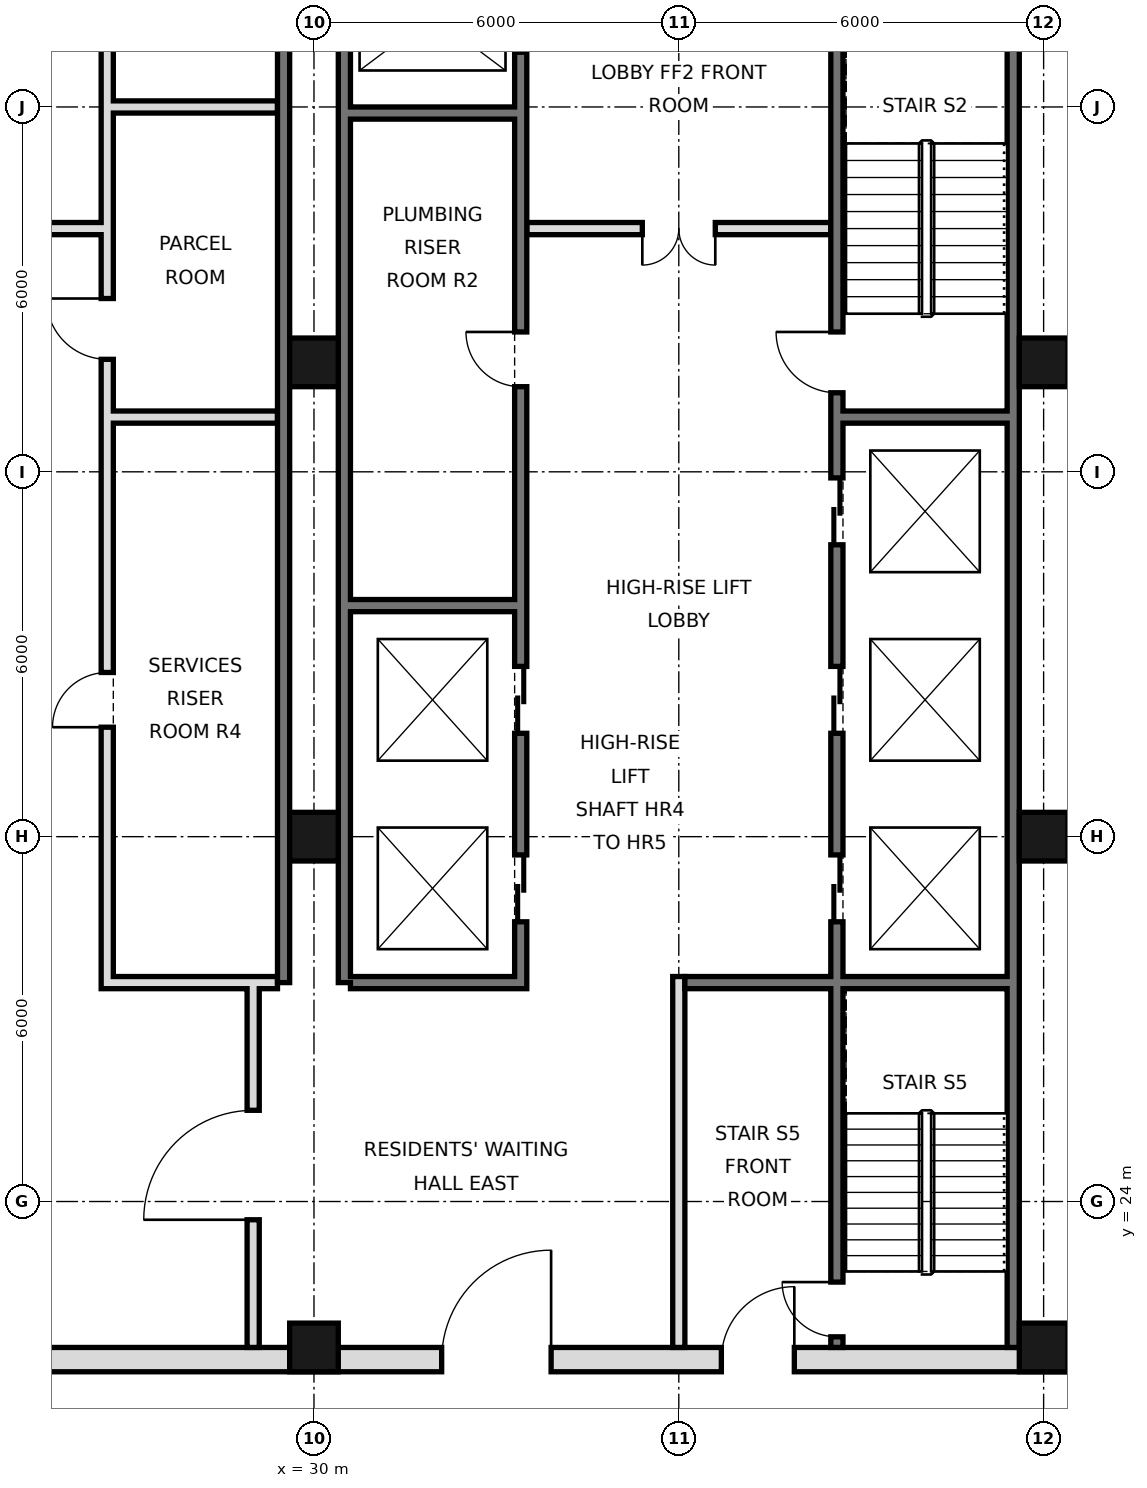
"""IFC4 building model, lengths in metres.
Left out: names, types, materials, properties, quantities, classifications, styles, units other than length and angle.
Written with IfcOpenShell. Run it as: python <this file> out.ifc"""

import sys

from ifc_helpers import new_model, si_unit, direction, frame, frame_2d, origin, origin_2d, place, context, subcontext, project, spatial, rectangle, hollow_rectangle, extrude, element, fill, save


model = new_model("IFC4")
c1 = context("Model", 3, precision=1e-05, world=origin(), true_north=direction((0.0, 1.0)))
c2 = subcontext(c1, "Body", "Model", "MODEL_VIEW")
j1 = project(units=[si_unit("LENGTHUNIT", "METRE"), si_unit("PLANEANGLEUNIT", "RADIAN")], contexts=[c1])
p1 = place(None, origin())
s1 = spatial("IfcSite", under=j1, at=p1, CompositionType="ELEMENT")
p2 = place(p1, origin())
s2 = spatial("IfcBuilding", under=s1, at=p2, CompositionType="ELEMENT")
p3 = place(p2, frame((0.0, 0.0, 273.8)))
s3 = spatial("IfcBuildingStorey", under=s2, at=p3, CompositionType="ELEMENT", Elevation=273.8)
for number, where, z_axis, x_axis in (
    (1, (30.0, 21.6, 0.0), (0.0, 0.0, 1.0), (1.0, 0.0, 0.0)),
    (2, (30.0, 30.0, 0.0), (0.0, 0.0, 1.0), (1.0, 0.0, 0.0)),
    (3, (30.0, 37.8, 0.0), (0.0, 0.0, 1.0), (1.0, 0.0, 0.0)),
    (4, (42.0, 21.6, 0.0), (0.0, 0.0, 1.0), (1.0, 0.0, 0.0)),
    (5, (42.0, 30.0, 0.0), (0.0, 0.0, 1.0), (1.0, 0.0, 0.0)),
    (6, (42.0, 37.8, 0.0), (0.0, 0.0, 1.0), (1.0, 0.0, 0.0)),
):
    element("IfcColumn", number, at=place(p3, frame(where, z_axis=z_axis, x_axis=x_axis)), inside=s3, PredefinedType="COLUMN", context=c2, shape_type="SweptSolid", body=[
        extrude(hollow_rectangle(XDim=0.8, YDim=0.8, WallThickness=0.032, at=origin_2d()), origin(), (0.0, 0.0, 1.0), 3.6),
    ])
p4 = place(p3, frame((41.5, 21.6, 0.0), z_axis=(0.0, 0.0, 1.0), x_axis=(0.0, 1.0, 0.0)))
e7 = element("IfcWall", 7, at=p4, inside=s3, PredefinedType="SOLIDWALL", context=c2, shape_type="SweptSolid", body=[
    extrude(rectangle(XDim=23.5, YDim=0.2, at=frame_2d((11.75, 0.0))), origin(), (0.0, 0.0, 1.0), 3.42),
])
for number, where, z_axis, x_axis in (
    (8, (29.5, 27.6, 0.0), (0.0, 0.0, 1.0), (0.0, 1.0, 0.0)),
    (9, (30.5, 27.6, 0.0), (0.0, 0.0, 1.0), (0.0, 1.0, 0.0)),
):
    element("IfcWall", number, at=place(p3, frame(where, z_axis=z_axis, x_axis=x_axis)), inside=s3, PredefinedType="SOLIDWALL", context=c2, shape_type="SweptSolid", body=[
        extrude(rectangle(XDim=17.5, YDim=0.2, at=frame_2d((8.75, 0.0))), origin(), (0.0, 0.0, 1.0), 3.42),
    ])
p5 = place(p3, frame((5.6, 21.4, 0.0), z_axis=(0.0, 0.0, 1.0), x_axis=(1.0, 0.0, 0.0)))
e10 = element("IfcWall", 10, at=p5, inside=s3, PredefinedType="SOLIDWALL", context=c2, shape_type="SweptSolid", body=[
    extrude(rectangle(XDim=36.8, YDim=0.4, at=frame_2d((18.4, 0.0))), origin(), (0.0, 0.0, 1.0), 3.42),
])
p6 = place(p5, frame((8.5, 0.0, 0.0)))
e11 = element("IfcOpeningElement", 11, at=p6, cuts=e10, PredefinedType="OPENING", context=c2, shape_type="SweptSolid", body=[
    extrude(rectangle(XDim=1.8, YDim=2.1, at=frame_2d((0.9, 1.05))), frame((0.0, 0.21, 0.0), z_axis=(0.0, -1.0, 0.0), x_axis=(1.0, 0.0, 0.0)), (0.0, 0.0, 1.0), 0.42),
])
p7 = place(p5, frame((17.5, 0.0, 0.0)))
e12 = element("IfcOpeningElement", 12, at=p7, cuts=e10, PredefinedType="OPENING", context=c2, shape_type="SweptSolid", body=[
    extrude(rectangle(XDim=1.8, YDim=2.1, at=frame_2d((0.9, 1.05))), frame((0.0, 0.21, 0.0), z_axis=(0.0, -1.0, 0.0), x_axis=(1.0, 0.0, 0.0)), (0.0, 0.0, 1.0), 0.42),
])
p8 = place(p5, frame((26.5, 0.0, 0.0)))
e13 = element("IfcOpeningElement", 13, at=p8, cuts=e10, PredefinedType="OPENING", context=c2, shape_type="SweptSolid", body=[
    extrude(rectangle(XDim=1.8, YDim=2.1, at=frame_2d((0.9, 1.05))), frame((0.0, 0.21, 0.0), z_axis=(0.0, -1.0, 0.0), x_axis=(1.0, 0.0, 0.0)), (0.0, 0.0, 1.0), 0.42),
])
p9 = place(p5, frame((4.5, 0.0, 0.0)))
e14 = element("IfcOpeningElement", 14, at=p9, cuts=e10, PredefinedType="OPENING", context=c2, shape_type="SweptSolid", body=[
    extrude(rectangle(XDim=1.2, YDim=2.1, at=frame_2d((0.6, 1.05))), frame((0.0, 0.21, 0.0), z_axis=(0.0, -1.0, 0.0), x_axis=(1.0, 0.0, 0.0)), (0.0, 0.0, 1.0), 0.42),
])
p10 = place(p5, frame((31.1, 0.0, 0.0)))
e15 = element("IfcOpeningElement", 15, at=p10, cuts=e10, PredefinedType="OPENING", context=c2, shape_type="SweptSolid", body=[
    extrude(rectangle(XDim=1.2, YDim=2.1, at=frame_2d((0.6, 1.05))), frame((0.0, 0.21, 0.0), z_axis=(0.0, -1.0, 0.0), x_axis=(1.0, 0.0, 0.0)), (0.0, 0.0, 1.0), 0.42),
])
p11 = place(p3, frame((29.0, 21.6, 0.0), z_axis=(0.0, 0.0, 1.0), x_axis=(0.0, 1.0, 0.0)))
e16 = element("IfcWall", 16, at=p11, inside=s3, PredefinedType="PARTITIONING", context=c2, shape_type="SweptSolid", body=[
    extrude(rectangle(XDim=6.0, YDim=0.2, at=frame_2d((3.0, 0.0))), origin(), (0.0, 0.0, 1.0), 3.42),
])
p12 = place(p11, frame((2.1, 0.0, 0.0)))
e17 = element("IfcOpeningElement", 17, at=p12, cuts=e16, PredefinedType="OPENING", context=c2, shape_type="SweptSolid", body=[
    extrude(rectangle(XDim=1.8, YDim=2.1, at=frame_2d((0.9, 1.05))), frame((0.0, 0.11, 0.0), z_axis=(0.0, -1.0, 0.0), x_axis=(1.0, 0.0, 0.0)), (0.0, 0.0, 1.0), 0.22),
])
p13 = place(p3, frame((26.6, 27.5, 0.0), z_axis=(0.0, 0.0, 1.0), x_axis=(0.0, 1.0, 0.0)))
e18 = element("IfcWall", 18, at=p13, inside=s3, PredefinedType="SOLIDWALL", context=c2, shape_type="SweptSolid", body=[
    extrude(rectangle(XDim=17.5, YDim=0.2, at=frame_2d((8.75, 0.0))), origin(), (0.0, 0.0, 1.0), 3.42),
])
p14 = place(p13, frame((4.3, 0.0, 0.0)))
e19 = element("IfcOpeningElement", 19, at=p14, cuts=e18, PredefinedType="OPENING", context=c2, shape_type="SweptSolid", body=[
    extrude(rectangle(XDim=0.9, YDim=2.1, at=frame_2d((0.45, 1.05))), frame((0.0, 0.11, 0.0), z_axis=(0.0, -1.0, 0.0), x_axis=(1.0, 0.0, 0.0)), (0.0, 0.0, 1.0), 0.22),
])
p15 = place(p13, frame((10.35, 0.0, 0.0)))
e20 = element("IfcOpeningElement", 20, at=p15, cuts=e18, PredefinedType="OPENING", context=c2, shape_type="SweptSolid", body=[
    extrude(rectangle(XDim=1.0, YDim=2.1, at=frame_2d((0.5, 1.05))), frame((0.0, 0.11, 0.0), z_axis=(0.0, -1.0, 0.0), x_axis=(1.0, 0.0, 0.0)), (0.0, 0.0, 1.0), 0.22),
])
p16 = place(p13, frame((15.475, 0.0, 0.0)))
e21 = element("IfcOpeningElement", 21, at=p16, cuts=e18, PredefinedType="OPENING", context=c2, shape_type="SweptSolid", body=[
    extrude(rectangle(XDim=1.0, YDim=2.1, at=frame_2d((0.5, 1.05))), frame((0.0, 0.11, 0.0), z_axis=(0.0, -1.0, 0.0), x_axis=(1.0, 0.0, 0.0)), (0.0, 0.0, 1.0), 0.22),
])
p17 = place(p3, frame((33.4, 27.5, 0.0), z_axis=(0.0, 0.0, 1.0), x_axis=(0.0, 1.0, 0.0)))
e22 = element("IfcWall", 22, at=p17, inside=s3, PredefinedType="SOLIDWALL", context=c2, shape_type="SweptSolid", body=[
    extrude(rectangle(XDim=17.5, YDim=0.2, at=frame_2d((8.75, 0.0))), origin(), (0.0, 0.0, 1.0), 3.42),
])
p18 = place(p17, frame((1.1, 0.0, 0.0)))
e23 = element("IfcOpeningElement", 23, at=p18, cuts=e22, PredefinedType="OPENING", context=c2, shape_type="SweptSolid", body=[
    extrude(rectangle(XDim=1.1, YDim=2.1, at=frame_2d((0.55, 1.05))), frame((0.0, 0.11, 0.0), z_axis=(0.0, -1.0, 0.0), x_axis=(1.0, 0.0, 0.0)), (0.0, 0.0, 1.0), 0.22),
])
p19 = place(p17, frame((4.2, 0.0, 0.0)))
e24 = element("IfcOpeningElement", 24, at=p19, cuts=e22, PredefinedType="OPENING", context=c2, shape_type="SweptSolid", body=[
    extrude(rectangle(XDim=1.1, YDim=2.1, at=frame_2d((0.55, 1.05))), frame((0.0, 0.11, 0.0), z_axis=(0.0, -1.0, 0.0), x_axis=(1.0, 0.0, 0.0)), (0.0, 0.0, 1.0), 0.22),
])
p20 = place(p17, frame((15.4, 0.0, 0.0)))
e25 = element("IfcOpeningElement", 25, at=p20, cuts=e22, PredefinedType="OPENING", context=c2, shape_type="SweptSolid", body=[
    extrude(rectangle(XDim=1.1, YDim=2.1, at=frame_2d((0.55, 1.05))), frame((0.0, 0.11, 0.0), z_axis=(0.0, -1.0, 0.0), x_axis=(1.0, 0.0, 0.0)), (0.0, 0.0, 1.0), 0.22),
])
p21 = place(p17, frame((9.9, 0.0, 0.0)))
e26 = element("IfcOpeningElement", 26, at=p21, cuts=e22, PredefinedType="OPENING", context=c2, shape_type="SweptSolid", body=[
    extrude(rectangle(XDim=0.9, YDim=2.1, at=frame_2d((0.45, 1.05))), frame((0.0, 0.11, 0.0), z_axis=(0.0, -1.0, 0.0), x_axis=(1.0, 0.0, 0.0)), (0.0, 0.0, 1.0), 0.22),
])
p22 = place(p3, frame((36.0, 21.6, 0.0), z_axis=(0.0, 0.0, 1.0), x_axis=(0.0, 1.0, 0.0)))
e27 = element("IfcWall", 27, at=p22, inside=s3, PredefinedType="PARTITIONING", context=c2, shape_type="SweptSolid", body=[
    extrude(rectangle(XDim=6.1, YDim=0.2, at=frame_2d((3.05, 0.0))), origin(), (0.0, 0.0, 1.0), 3.42),
])
p23 = place(p3, frame((38.6, 21.6, 0.0), z_axis=(0.0, 0.0, 1.0), x_axis=(0.0, 1.0, 0.0)))
e28 = element("IfcWall", 28, at=p23, inside=s3, PredefinedType="SOLIDWALL", context=c2, shape_type="SweptSolid", body=[
    extrude(rectangle(XDim=23.4, YDim=0.2, at=frame_2d((11.7, 0.0))), origin(), (0.0, 0.0, 1.0), 3.42),
])
p24 = place(p23, frame((7.0, 0.0, 0.0)))
e29 = element("IfcOpeningElement", 29, at=p24, cuts=e28, PredefinedType="OPENING", context=c2, shape_type="SweptSolid", body=[
    extrude(rectangle(XDim=1.1, YDim=2.1, at=frame_2d((0.55, 1.05))), frame((0.0, 0.11, 0.0), z_axis=(0.0, -1.0, 0.0), x_axis=(1.0, 0.0, 0.0)), (0.0, 0.0, 1.0), 0.22),
])
p25 = place(p23, frame((10.1, 0.0, 0.0)))
e30 = element("IfcOpeningElement", 30, at=p25, cuts=e28, PredefinedType="OPENING", context=c2, shape_type="SweptSolid", body=[
    extrude(rectangle(XDim=1.1, YDim=2.1, at=frame_2d((0.55, 1.05))), frame((0.0, 0.11, 0.0), z_axis=(0.0, -1.0, 0.0), x_axis=(1.0, 0.0, 0.0)), (0.0, 0.0, 1.0), 0.22),
])
p26 = place(p23, frame((13.2, 0.0, 0.0)))
e31 = element("IfcOpeningElement", 31, at=p26, cuts=e28, PredefinedType="OPENING", context=c2, shape_type="SweptSolid", body=[
    extrude(rectangle(XDim=1.1, YDim=2.1, at=frame_2d((0.55, 1.05))), frame((0.0, 0.11, 0.0), z_axis=(0.0, -1.0, 0.0), x_axis=(1.0, 0.0, 0.0)), (0.0, 0.0, 1.0), 0.22),
])
p27 = place(p23, frame((15.7, 0.0, 0.0)))
e32 = element("IfcOpeningElement", 32, at=p27, cuts=e28, PredefinedType="OPENING", context=c2, shape_type="SweptSolid", body=[
    extrude(rectangle(XDim=1.0, YDim=2.1, at=frame_2d((0.5, 1.05))), frame((0.0, 0.11, 0.0), z_axis=(0.0, -1.0, 0.0), x_axis=(1.0, 0.0, 0.0)), (0.0, 0.0, 1.0), 0.22),
])
p28 = place(p23, frame((0.175, 0.0, 0.0)))
e33 = element("IfcOpeningElement", 33, at=p28, cuts=e28, PredefinedType="OPENING", context=c2, shape_type="SweptSolid", body=[
    extrude(rectangle(XDim=0.9, YDim=2.1, at=frame_2d((0.45, 1.05))), frame((0.0, 0.11, 0.0), z_axis=(0.0, -1.0, 0.0), x_axis=(1.0, 0.0, 0.0)), (0.0, 0.0, 1.0), 0.22),
])
for number, where, z_axis, x_axis in (
    (34, (26.7, 27.6, 0.0), (0.0, 0.0, 1.0), (1.0, 0.0, 0.0)),
    (35, (30.6, 27.6, 0.0), (0.0, 0.0, 1.0), (1.0, 0.0, 0.0)),
):
    element("IfcWall", number, at=place(p3, frame(where, z_axis=z_axis, x_axis=x_axis)), inside=s3, PredefinedType="SOLIDWALL", context=c2, shape_type="SweptSolid", body=[
        extrude(rectangle(XDim=2.7, YDim=0.2, at=frame_2d((1.35, 0.0))), origin(), (0.0, 0.0, 1.0), 3.42),
    ])
p29 = place(p3, frame((36.1, 27.6, 0.0), z_axis=(0.0, 0.0, 1.0), x_axis=(1.0, 0.0, 0.0)))
e36 = element("IfcWall", 36, at=p29, inside=s3, PredefinedType="SOLIDWALL", context=c2, shape_type="SweptSolid", body=[
    extrude(rectangle(XDim=5.3, YDim=0.2, at=frame_2d((2.65, 0.0))), origin(), (0.0, 0.0, 1.0), 3.42),
])
for number, where, z_axis, x_axis in (
    (37, (30.6, 33.8, 0.0), (0.0, 0.0, 1.0), (1.0, 0.0, 0.0)),
    (38, (26.7, 36.9, 0.0), (0.0, 0.0, 1.0), (1.0, 0.0, 0.0)),
    (39, (38.7, 36.9, 0.0), (0.0, 0.0, 1.0), (1.0, 0.0, 0.0)),
):
    element("IfcWall", number, at=place(p3, frame(where, z_axis=z_axis, x_axis=x_axis)), inside=s3, PredefinedType="SOLIDWALL", context=c2, shape_type="SweptSolid", body=[
        extrude(rectangle(XDim=2.7, YDim=0.2, at=frame_2d((1.35, 0.0))), origin(), (0.0, 0.0, 1.0), 3.42),
    ])
p30 = place(p3, frame((21.5, 40.0, 0.0), z_axis=(0.0, 0.0, 1.0), x_axis=(1.0, 0.0, 0.0)))
e40 = element("IfcWall", 40, at=p30, inside=s3, PredefinedType="PARTITIONING", context=c2, shape_type="SweptSolid", body=[
    extrude(rectangle(XDim=5.0, YDim=0.2, at=frame_2d((2.5, 0.0))), origin(), (0.0, 0.0, 1.0), 3.42),
])
p31 = place(p30, frame((1.9, 0.0, 0.0)))
e41 = element("IfcOpeningElement", 41, at=p31, cuts=e40, PredefinedType="OPENING", context=c2, shape_type="SweptSolid", body=[
    extrude(rectangle(XDim=1.2, YDim=2.1, at=frame_2d((0.6, 1.05))), frame((0.0, 0.11, 0.0), z_axis=(0.0, -1.0, 0.0), x_axis=(1.0, 0.0, 0.0)), (0.0, 0.0, 1.0), 0.22),
])
p32 = place(p3, frame((33.5, 40.0, 0.0), z_axis=(0.0, 0.0, 1.0), x_axis=(1.0, 0.0, 0.0)))
e42 = element("IfcWall", 42, at=p32, inside=s3, PredefinedType="PARTITIONING", context=c2, shape_type="SweptSolid", body=[
    extrude(rectangle(XDim=5.0, YDim=0.2, at=frame_2d((2.5, 0.0))), origin(), (0.0, 0.0, 1.0), 3.42),
])
p33 = place(p32, frame((1.9, 0.0, 0.0)))
e43 = element("IfcOpeningElement", 43, at=p33, cuts=e42, PredefinedType="OPENING", context=c2, shape_type="SweptSolid", body=[
    extrude(rectangle(XDim=1.2, YDim=2.1, at=frame_2d((0.6, 1.05))), frame((0.0, 0.11, 0.0), z_axis=(0.0, -1.0, 0.0), x_axis=(1.0, 0.0, 0.0)), (0.0, 0.0, 1.0), 0.22),
])
p34 = place(p3, frame((30.6, 41.9, 0.0), z_axis=(0.0, 0.0, 1.0), x_axis=(1.0, 0.0, 0.0)))
e44 = element("IfcWall", 44, at=p34, inside=s3, PredefinedType="SOLIDWALL", context=c2, shape_type="SweptSolid", body=[
    extrude(rectangle(XDim=2.7, YDim=0.2, at=frame_2d((1.35, 0.0))), origin(), (0.0, 0.0, 1.0), 3.42),
])
p35 = place(p3, frame((26.7, 42.0, 0.0), z_axis=(0.0, 0.0, 1.0), x_axis=(1.0, 0.0, 0.0)))
e45 = element("IfcWall", 45, at=p35, inside=s3, PredefinedType="PARTITIONING", context=c2, shape_type="SweptSolid", body=[
    extrude(rectangle(XDim=2.7, YDim=0.2, at=frame_2d((1.35, 0.0))), origin(), (0.0, 0.0, 1.0), 3.42),
])
p36 = place(p12, origin())
e46 = element("IfcDoor", 46, at=p36, inside=s3, OperationType="SINGLE_SWING_LEFT", PredefinedType="DOOR", context=c2, shape_type="SweptSolid", body=[
    extrude(rectangle(XDim=1.8, YDim=2.1, at=frame_2d((0.9, 1.05))), frame((0.0, 0.025, 0.0), z_axis=(0.0, -1.0, 0.0), x_axis=(1.0, 0.0, 0.0)), (0.0, 0.0, 1.0), 0.05),
])
fill(e17, e46)
p37 = place(p8, frame((1.8, 0.0, 0.0), z_axis=(0.0, 0.0, 1.0), x_axis=(-1.0, 0.0, 0.0)))
e47 = element("IfcDoor", 47, at=p37, inside=s3, OperationType="SINGLE_SWING_LEFT", PredefinedType="DOOR", context=c2, shape_type="SweptSolid", body=[
    extrude(rectangle(XDim=1.8, YDim=2.1, at=frame_2d((0.9, 1.05))), frame((0.0, 0.025, 0.0), z_axis=(0.0, -1.0, 0.0), x_axis=(1.0, 0.0, 0.0)), (0.0, 0.0, 1.0), 0.05),
])
fill(e13, e47)
p38 = place(p10, frame((1.2, 0.0, 0.0), z_axis=(0.0, 0.0, 1.0), x_axis=(-1.0, 0.0, 0.0)))
e48 = element("IfcDoor", 48, at=p38, inside=s3, OperationType="SINGLE_SWING_LEFT", PredefinedType="DOOR", context=c2, shape_type="SweptSolid", body=[
    extrude(rectangle(XDim=1.2, YDim=2.1, at=frame_2d((0.6, 1.05))), frame((0.0, 0.025, 0.0), z_axis=(0.0, -1.0, 0.0), x_axis=(1.0, 0.0, 0.0)), (0.0, 0.0, 1.0), 0.05),
])
fill(e15, e48)
p39 = place(p33, frame((1.2, 0.0, 0.0), z_axis=(0.0, 0.0, 1.0), x_axis=(-1.0, 0.0, 0.0)))
e49 = element("IfcDoor", 49, at=p39, inside=s3, OperationType="DOUBLE_DOOR_SINGLE_SWING", PredefinedType="DOOR", context=c2, shape_type="SweptSolid", body=[
    extrude(rectangle(XDim=1.2, YDim=2.1, at=frame_2d((0.6, 1.05))), frame((0.0, 0.025, 0.0), z_axis=(0.0, -1.0, 0.0), x_axis=(1.0, 0.0, 0.0)), (0.0, 0.0, 1.0), 0.05),
])
fill(e43, e49)
p40 = place(p24, origin())
e50 = element("IfcDoor", 50, at=p40, inside=s3, OperationType="DOUBLE_DOOR_SLIDING", PredefinedType="DOOR", context=c2, shape_type="SweptSolid", body=[
    extrude(rectangle(XDim=1.1, YDim=2.1, at=frame_2d((0.55, 1.05))), frame((0.0, 0.025, 0.0), z_axis=(0.0, -1.0, 0.0), x_axis=(1.0, 0.0, 0.0)), (0.0, 0.0, 1.0), 0.05),
])
fill(e29, e50)
p41 = place(p25, origin())
e51 = element("IfcDoor", 51, at=p41, inside=s3, OperationType="DOUBLE_DOOR_SLIDING", PredefinedType="DOOR", context=c2, shape_type="SweptSolid", body=[
    extrude(rectangle(XDim=1.1, YDim=2.1, at=frame_2d((0.55, 1.05))), frame((0.0, 0.025, 0.0), z_axis=(0.0, -1.0, 0.0), x_axis=(1.0, 0.0, 0.0)), (0.0, 0.0, 1.0), 0.05),
])
fill(e30, e51)
p42 = place(p26, origin())
e52 = element("IfcDoor", 52, at=p42, inside=s3, OperationType="DOUBLE_DOOR_SLIDING", PredefinedType="DOOR", context=c2, shape_type="SweptSolid", body=[
    extrude(rectangle(XDim=1.1, YDim=2.1, at=frame_2d((0.55, 1.05))), frame((0.0, 0.025, 0.0), z_axis=(0.0, -1.0, 0.0), x_axis=(1.0, 0.0, 0.0)), (0.0, 0.0, 1.0), 0.05),
])
fill(e31, e52)
p43 = place(p18, origin())
e53 = element("IfcDoor", 53, at=p43, inside=s3, OperationType="DOUBLE_DOOR_SLIDING", PredefinedType="DOOR", context=c2, shape_type="SweptSolid", body=[
    extrude(rectangle(XDim=1.1, YDim=2.1, at=frame_2d((0.55, 1.05))), frame((0.0, 0.025, 0.0), z_axis=(0.0, -1.0, 0.0), x_axis=(1.0, 0.0, 0.0)), (0.0, 0.0, 1.0), 0.05),
])
fill(e23, e53)
p44 = place(p19, origin())
e54 = element("IfcDoor", 54, at=p44, inside=s3, OperationType="DOUBLE_DOOR_SLIDING", PredefinedType="DOOR", context=c2, shape_type="SweptSolid", body=[
    extrude(rectangle(XDim=1.1, YDim=2.1, at=frame_2d((0.55, 1.05))), frame((0.0, 0.025, 0.0), z_axis=(0.0, -1.0, 0.0), x_axis=(1.0, 0.0, 0.0)), (0.0, 0.0, 1.0), 0.05),
])
fill(e24, e54)
p45 = place(p27, frame((1.0, 0.0, 0.0), z_axis=(0.0, 0.0, 1.0), x_axis=(-1.0, 0.0, 0.0)))
e55 = element("IfcDoor", 55, at=p45, inside=s3, OperationType="SINGLE_SWING_LEFT", PredefinedType="DOOR", context=c2, shape_type="SweptSolid", body=[
    extrude(rectangle(XDim=1.0, YDim=2.1, at=frame_2d((0.5, 1.05))), frame((0.0, 0.025, 0.0), z_axis=(0.0, -1.0, 0.0), x_axis=(1.0, 0.0, 0.0)), (0.0, 0.0, 1.0), 0.05),
])
fill(e32, e55)
p46 = place(p28, frame((0.9, 0.0, 0.0), z_axis=(0.0, 0.0, 1.0), x_axis=(-1.0, 0.0, 0.0)))
e56 = element("IfcDoor", 56, at=p46, inside=s3, OperationType="SINGLE_SWING_LEFT", PredefinedType="DOOR", context=c2, shape_type="SweptSolid", body=[
    extrude(rectangle(XDim=0.9, YDim=2.1, at=frame_2d((0.45, 1.05))), frame((0.0, 0.025, 0.0), z_axis=(0.0, -1.0, 0.0), x_axis=(1.0, 0.0, 0.0)), (0.0, 0.0, 1.0), 0.05),
])
fill(e33, e56)
p47 = place(p21, frame((0.9, 0.0, 0.0), z_axis=(0.0, 0.0, 1.0), x_axis=(-1.0, 0.0, 0.0)))
e57 = element("IfcDoor", 57, at=p47, inside=s3, OperationType="SINGLE_SWING_LEFT", PredefinedType="DOOR", context=c2, shape_type="SweptSolid", body=[
    extrude(rectangle(XDim=0.9, YDim=2.1, at=frame_2d((0.45, 1.05))), frame((0.0, 0.025, 0.0), z_axis=(0.0, -1.0, 0.0), x_axis=(1.0, 0.0, 0.0)), (0.0, 0.0, 1.0), 0.05),
])
fill(e26, e57)
p48 = place(p14, origin())
e58 = element("IfcDoor", 58, at=p48, inside=s3, OperationType="SINGLE_SWING_LEFT", PredefinedType="DOOR", context=c2, shape_type="SweptSolid", body=[
    extrude(rectangle(XDim=0.9, YDim=2.1, at=frame_2d((0.45, 1.05))), frame((0.0, 0.025, 0.0), z_axis=(0.0, -1.0, 0.0), x_axis=(1.0, 0.0, 0.0)), (0.0, 0.0, 1.0), 0.05),
])
fill(e19, e58)
p49 = place(p15, frame((1.0, 0.0, 0.0), z_axis=(0.0, 0.0, 1.0), x_axis=(-1.0, 0.0, 0.0)))
e59 = element("IfcDoor", 59, at=p49, inside=s3, OperationType="SINGLE_SWING_LEFT", PredefinedType="DOOR", context=c2, shape_type="SweptSolid", body=[
    extrude(rectangle(XDim=1.0, YDim=2.1, at=frame_2d((0.5, 1.05))), frame((0.0, 0.025, 0.0), z_axis=(0.0, -1.0, 0.0), x_axis=(1.0, 0.0, 0.0)), (0.0, 0.0, 1.0), 0.05),
])
fill(e20, e59)
save(model, sys.argv[1])
